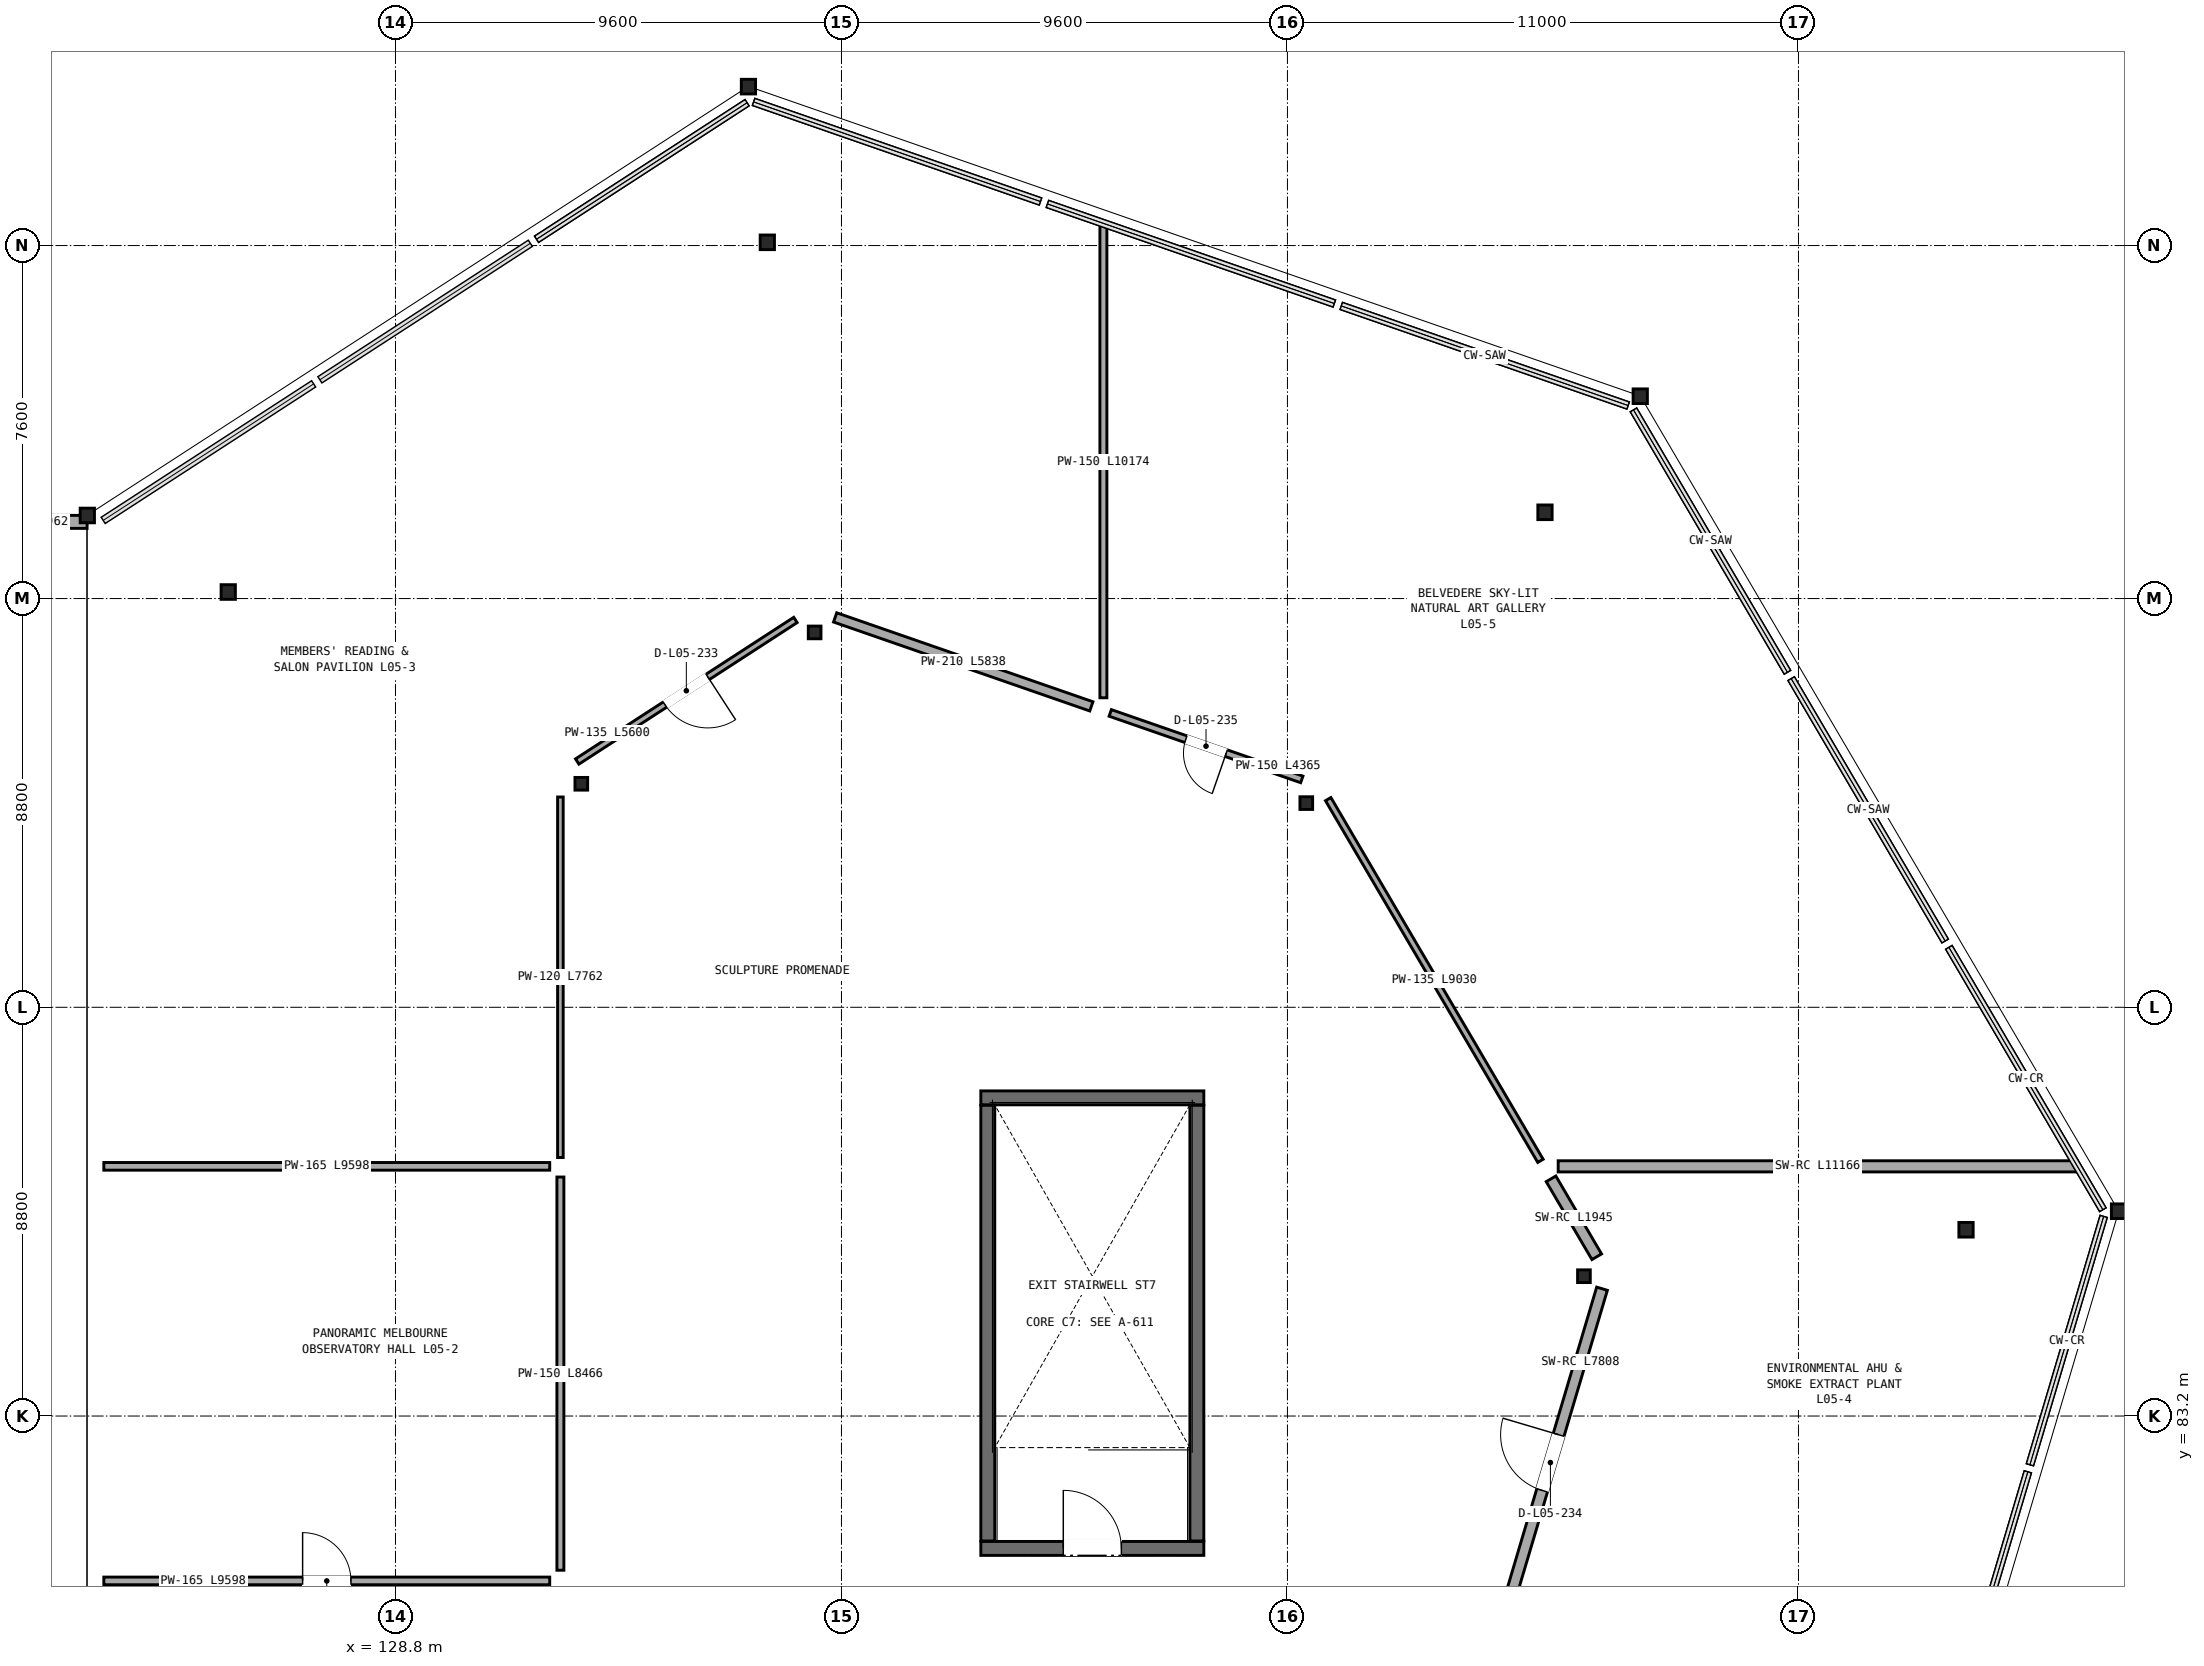
"""IFC4 building model, lengths in metres.
Left out: names, types, materials, properties, quantities, classifications, styles, units other than length and angle.
Written with IfcOpenShell. Run it as: python <this file> out.ifc"""

import sys

from ifc_helpers import new_model, si_unit, direction, frame, frame_2d, origin, origin_2d, place, context, subcontext, project, spatial, rectangle, hollow_circle, i_section, extrude, element, fill, save


model = new_model("IFC4")
c1 = context("Model", 3, precision=1e-05, world=origin(), true_north=direction((0.0, 1.0)))
c2 = subcontext(c1, "Body", "Model", "MODEL_VIEW")
j1 = project(units=[si_unit("LENGTHUNIT", "METRE"), si_unit("PLANEANGLEUNIT", "RADIAN")], contexts=[c1])
p1 = place(None, origin())
s1 = spatial("IfcSite", under=j1, at=p1, CompositionType="ELEMENT")
p2 = place(p1, origin())
s2 = spatial("IfcBuilding", under=s1, at=p2, CompositionType="ELEMENT")
p3 = place(p2, frame((0.0, 0.0, 28.1)))
s3 = spatial("IfcBuildingStorey", under=s2, at=p3, CompositionType="ELEMENT", Elevation=28.1)
p4 = place(p3, frame((165.889, 87.61, 0.035), z_axis=(-0.04804001111, -0.005843865394, 0.998828316864), x_axis=(0.120755624361, -0.99268226497, 0.0)))
e1 = element("IfcColumn", 1, at=p4, inside=s3, PredefinedType="COLUMN", context=c2, shape_type="SweptSolid", body=[
    extrude(i_section(OverallWidth=0.307, OverallDepth=0.315, WebThickness=0.012, FlangeThickness=0.019, FilletRadius=0.017, at=origin_2d()), origin(), (0.0, 0.0, 1.0), 5.682),
])
p5 = place(p3, frame((162.607, 87.21, 0.0), z_axis=(0.0, 0.0, 1.0), x_axis=(1.0, 0.0, 0.0)))
e2 = element("IfcColumn", 2, at=p5, inside=s3, PredefinedType="COLUMN", context=c2, shape_type="SweptSolid", body=[
    extrude(i_section(OverallWidth=0.307, OverallDepth=0.315, WebThickness=0.012, FlangeThickness=0.019, FilletRadius=0.017, at=origin_2d()), origin(), (0.0, 0.0, 1.0), 4.3),
])
p6 = place(p3, frame((154.382, 86.21, 0.0), z_axis=(0.0, 0.0, 1.0), x_axis=(1.0, 0.0, 0.0)))
e3 = element("IfcColumn", 3, at=p6, inside=s3, PredefinedType="COLUMN", context=c2, shape_type="SweptSolid", body=[
    extrude(hollow_circle(Radius=0.136, WallThickness=0.009, at=origin_2d()), origin(), (0.0, 0.0, 1.0), 4.3),
])
p7 = place(p3, frame((155.594, 105.156, 0.035), z_axis=(-0.027795330703, -0.033888003479, 0.999039049693), x_axis=(0.773187597765, -0.63417737161, 0.0)))
e4 = element("IfcColumn", 4, at=p7, inside=s3, PredefinedType="COLUMN", context=c2, shape_type="SweptSolid", body=[
    extrude(i_section(OverallWidth=0.307, OverallDepth=0.315, WebThickness=0.012, FlangeThickness=0.019, FilletRadius=0.017, at=origin_2d()), origin(), (0.0, 0.0, 1.0), 6.131),
])
p8 = place(p3, frame((153.544, 102.657, 0.0), z_axis=(0.0, 0.0, 1.0), x_axis=(1.0, 0.0, 0.0)))
e5 = element("IfcColumn", 5, at=p8, inside=s3, PredefinedType="COLUMN", context=c2, shape_type="SweptSolid", body=[
    extrude(i_section(OverallWidth=0.307, OverallDepth=0.315, WebThickness=0.012, FlangeThickness=0.019, FilletRadius=0.017, at=origin_2d()), origin(), (0.0, 0.0, 1.0), 4.3),
])
p9 = place(p3, frame((148.406, 96.396, 0.0), z_axis=(0.0, 0.0, 1.0), x_axis=(1.0, 0.0, 0.0)))
e6 = element("IfcColumn", 6, at=p9, inside=s3, PredefinedType="COLUMN", context=c2, shape_type="SweptSolid", body=[
    extrude(hollow_circle(Radius=0.136, WallThickness=0.009, at=origin_2d()), origin(), (0.0, 0.0, 1.0), 4.3),
])
p10 = place(p3, frame((136.398, 111.821, 0.035), z_axis=(0.006378097242, -0.052734847487, 0.998588181252), x_axis=(0.992765244262, 0.120071519464, 0.0)))
e7 = element("IfcColumn", 7, at=p10, inside=s3, PredefinedType="COLUMN", context=c2, shape_type="SweptSolid", body=[
    extrude(i_section(OverallWidth=0.307, OverallDepth=0.315, WebThickness=0.012, FlangeThickness=0.019, FilletRadius=0.017, at=origin_2d()), origin(), (0.0, 0.0, 1.0), 5.282),
])
p11 = place(p3, frame((136.804, 108.469, 0.0), z_axis=(0.0, 0.0, 1.0), x_axis=(1.0, 0.0, 0.0)))
e8 = element("IfcColumn", 8, at=p11, inside=s3, PredefinedType="COLUMN", context=c2, shape_type="SweptSolid", body=[
    extrude(i_section(OverallWidth=0.307, OverallDepth=0.315, WebThickness=0.012, FlangeThickness=0.019, FilletRadius=0.017, at=origin_2d()), origin(), (0.0, 0.0, 1.0), 4.3),
])
p12 = place(p3, frame((137.823, 100.071, 0.0), z_axis=(0.0, 0.0, 1.0), x_axis=(1.0, 0.0, 0.0)))
e9 = element("IfcColumn", 9, at=p12, inside=s3, PredefinedType="COLUMN", context=c2, shape_type="SweptSolid", body=[
    extrude(hollow_circle(Radius=0.136, WallThickness=0.009, at=origin_2d()), origin(), (0.0, 0.0, 1.0), 4.3),
])
p13 = place(p3, frame((122.167, 102.588, 0.035), z_axis=(0.062500546589, -0.033942697615, 0.997467580904), x_axis=(0.477242042364, 0.878771889059, 0.0)))
e10 = element("IfcColumn", 10, at=p13, inside=s3, PredefinedType="COLUMN", context=c2, shape_type="SweptSolid", body=[
    extrude(i_section(OverallWidth=0.307, OverallDepth=0.315, WebThickness=0.012, FlangeThickness=0.019, FilletRadius=0.017, at=origin_2d()), origin(), (0.0, 0.0, 1.0), 4.035),
])
p14 = place(p3, frame((125.2, 100.941, 0.0), z_axis=(0.0, 0.0, 1.0), x_axis=(1.0, 0.0, 0.0)))
e11 = element("IfcColumn", 11, at=p14, inside=s3, PredefinedType="COLUMN", context=c2, shape_type="SweptSolid", body=[
    extrude(i_section(OverallWidth=0.307, OverallDepth=0.315, WebThickness=0.012, FlangeThickness=0.019, FilletRadius=0.017, at=origin_2d()), origin(), (0.0, 0.0, 1.0), 4.3),
])
p15 = place(p3, frame((132.8, 96.812, 0.0), z_axis=(0.0, 0.0, 1.0), x_axis=(1.0, 0.0, 0.0)))
e12 = element("IfcColumn", 12, at=p15, inside=s3, PredefinedType="COLUMN", context=c2, shape_type="SweptSolid", body=[
    extrude(hollow_circle(Radius=0.136, WallThickness=0.009, at=origin_2d()), origin(), (0.0, 0.0, 1.0), 4.3),
])
p16 = place(p3, frame((122.162, 102.451, 0.0), z_axis=(0.0, 0.0, 1.0), x_axis=(-1.0, 0.0, 0.0)))
e13 = element("IfcWall", 13, at=p16, inside=s3, PredefinedType="STANDARD", context=c2, shape_type="SweptSolid", body=[
    extrude(rectangle(XDim=2.962, YDim=0.28, at=frame_2d((1.481, 0.0))), origin(), (0.0, 0.0, 1.0), 3.255),
])
p17 = place(p3, frame((141.4, 80.35, 0.0), z_axis=(0.0, 0.0, 1.0), x_axis=(1.0, 0.0, 0.0)))
e14 = element("IfcWall", 14, at=p17, inside=s3, PredefinedType="SHEAR", context=c2, shape_type="SweptSolid", body=[
    extrude(rectangle(XDim=4.8, YDim=0.3, at=frame_2d((2.4, 0.0))), origin(), (0.0, 0.0, 1.0), 4.245),
])
p18 = place(p17, frame((1.775, 0.0, 0.0)))
e15 = element("IfcOpeningElement", 15, at=p18, cuts=e14, PredefinedType="OPENING", context=c2, shape_type="SweptSolid", body=[
    extrude(rectangle(XDim=1.25, YDim=2.2, at=frame_2d((0.625, 1.1))), frame((0.0, 0.16, 0.0), z_axis=(0.0, -1.0, 0.0), x_axis=(1.0, 0.0, 0.0)), (0.0, 0.0, 1.0), 0.32),
])
p19 = place(p3, frame((146.2, 90.05, 0.0), z_axis=(0.0, 0.0, 1.0), x_axis=(-1.0, 0.0, 0.0)))
e16 = element("IfcWall", 16, at=p19, inside=s3, PredefinedType="SHEAR", context=c2, shape_type="SweptSolid", body=[
    extrude(rectangle(XDim=4.8, YDim=0.3, at=frame_2d((2.4, 0.0))), origin(), (0.0, 0.0, 1.0), 4.245),
])
for number, where, z_axis, x_axis in (
    (17, (146.05, 80.51, 0.0), (0.0, 0.0, 1.0), (0.0, 1.0, 0.0)),
    (18, (141.55, 89.89, 0.0), (0.0, 0.0, 1.0), (0.0, -1.0, 0.0)),
):
    element("IfcWall", number, at=place(p3, frame(where, z_axis=z_axis, x_axis=x_axis)), inside=s3, PredefinedType="SHEAR", context=c2, shape_type="SweptSolid", body=[
        extrude(rectangle(XDim=9.38, YDim=0.3, at=frame_2d((4.69, 0.0))), origin(), (0.0, 0.0, 1.0), 4.245),
    ])
p20 = place(p3, frame((132.12, 79.65, 0.0), z_axis=(0.0, 0.0, 1.0), x_axis=(-1.0, 0.0, 0.0)))
e19 = element("IfcWall", 19, at=p20, inside=s3, PredefinedType="PARTITIONING", context=c2, shape_type="SweptSolid", body=[
    extrude(rectangle(XDim=9.598, YDim=0.165, at=frame_2d((4.799, 0.0))), origin(), (0.0, 0.0, 1.0), 2.45),
])
p21 = place(p20, frame((4.279, 0.0, 0.0)))
e20 = element("IfcOpeningElement", 20, at=p21, cuts=e19, PredefinedType="OPENING", context=c2, shape_type="SweptSolid", body=[
    extrude(rectangle(XDim=1.04, YDim=2.08, at=frame_2d((0.52, 1.04))), frame((0.0, 0.093, 0.0), z_axis=(0.0, -1.0, 0.0), x_axis=(1.0, 0.0, 0.0)), (0.0, 0.0, 1.0), 0.185),
])
p22 = place(p3, frame((132.35, 88.346, 0.0), z_axis=(0.0, 0.0, 1.0), x_axis=(0.0, -1.0, 0.0)))
e21 = element("IfcWall", 21, at=p22, inside=s3, PredefinedType="PARTITIONING", context=c2, shape_type="SweptSolid", body=[
    extrude(rectangle(XDim=8.466, YDim=0.15, at=frame_2d((4.233, 0.0))), origin(), (0.0, 0.0, 1.0), 4.13),
])
p23 = place(p3, frame((137.409, 100.339, 0.0), z_axis=(0.0, 0.0, 1.0), x_axis=(-0.838914477988, -0.544263262238, 0.0)))
e22 = element("IfcWall", 22, at=p23, inside=s3, PredefinedType="PARTITIONING", context=c2, shape_type="SweptSolid", body=[
    extrude(rectangle(XDim=5.6, YDim=0.135, at=frame_2d((2.8, 0.0))), origin(), (0.0, 0.0, 1.0), 2.45),
])
p24 = place(p23, frame((2.25, 0.0, 0.0)))
e23 = element("IfcOpeningElement", 23, at=p24, cuts=e22, PredefinedType="OPENING", context=c2, shape_type="SweptSolid", body=[
    extrude(rectangle(XDim=1.1, YDim=2.08, at=frame_2d((0.55, 1.04))), frame((0.0, 0.078, 0.0), z_axis=(0.0, -1.0, 0.0), x_axis=(1.0, 0.0, 0.0)), (0.0, 0.0, 1.0), 0.155),
])
p25 = place(p3, frame((132.35, 96.527, 0.0), z_axis=(0.0, 0.0, 1.0), x_axis=(0.0, -1.0, 0.0)))
e24 = element("IfcWall", 24, at=p25, inside=s3, PredefinedType="PARTITIONING", context=c2, shape_type="SweptSolid", body=[
    extrude(rectangle(XDim=7.762, YDim=0.12, at=frame_2d((3.881, 0.0))), origin(), (0.0, 0.0, 1.0), 4.13),
])
p26 = place(p3, frame((143.779, 98.479, 0.0), z_axis=(0.0, 0.0, 1.0), x_axis=(-0.94466592491, 0.328033977378, 0.0)))
e25 = element("IfcWall", 25, at=p26, inside=s3, PredefinedType="PARTITIONING", context=c2, shape_type="SweptSolid", body=[
    extrude(rectangle(XDim=5.838, YDim=0.21, at=frame_2d((2.919, 0.0))), origin(), (0.0, 0.0, 1.0), 4.13),
])
p27 = place(p3, frame((152.549, 78.456, 0.0), z_axis=(0.0, 0.0, 1.0), x_axis=(0.284584370511, 0.958650998049, 0.0)))
e26 = element("IfcWall", 26, at=p27, inside=s3, PredefinedType="SOLIDWALL", context=c2, shape_type="SweptSolid", body=[
    extrude(rectangle(XDim=7.808, YDim=0.24, at=frame_2d((3.904, 0.0))), origin(), (0.0, 0.0, 1.0), 2.45),
])
p28 = place(p27, frame((3.279, 0.0, 0.0)))
e27 = element("IfcOpeningElement", 27, at=p28, cuts=e26, PredefinedType="OPENING", context=c2, shape_type="SweptSolid", body=[
    extrude(rectangle(XDim=1.25, YDim=2.2, at=frame_2d((0.625, 1.1))), frame((0.0, 0.13, 0.0), z_axis=(0.0, -1.0, 0.0), x_axis=(1.0, 0.0, 0.0)), (0.0, 0.0, 1.0), 0.26),
])
p29 = place(p3, frame((154.658, 86.629, 0.0), z_axis=(0.0, 0.0, 1.0), x_axis=(-0.505961073315, 0.862556312533, 0.0)))
e28 = element("IfcWall", 28, at=p29, inside=s3, PredefinedType="SOLIDWALL", context=c2, shape_type="SweptSolid", body=[
    extrude(rectangle(XDim=1.945, YDim=0.24, at=frame_2d((0.973, 0.0))), origin(), (0.0, 0.0, 1.0), 4.13),
])
p30 = place(p3, frame((148.309, 96.906, 0.0), z_axis=(0.0, 0.0, 1.0), x_axis=(-0.944666442817, 0.328032485916, 0.0)))
e29 = element("IfcWall", 29, at=p30, inside=s3, PredefinedType="PARTITIONING", context=c2, shape_type="SweptSolid", body=[
    extrude(rectangle(XDim=4.365, YDim=0.15, at=frame_2d((2.183, 0.0))), origin(), (0.0, 0.0, 1.0), 2.45),
])
p31 = place(p30, frame((1.723, 0.0, 0.0)))
e30 = element("IfcOpeningElement", 30, at=p31, cuts=e29, PredefinedType="OPENING", context=c2, shape_type="SweptSolid", body=[
    extrude(rectangle(XDim=0.92, YDim=2.16, at=frame_2d((0.46, 1.08))), frame((0.0, 0.085, 0.0), z_axis=(0.0, -1.0, 0.0), x_axis=(1.0, 0.0, 0.0)), (0.0, 0.0, 1.0), 0.17),
])
p32 = place(p3, frame((153.447, 88.694, 0.0), z_axis=(0.0, 0.0, 1.0), x_axis=(-0.506061544591, 0.862497369901, 0.0)))
e31 = element("IfcWall", 31, at=p32, inside=s3, PredefinedType="PARTITIONING", context=c2, shape_type="SweptSolid", body=[
    extrude(rectangle(XDim=9.03, YDim=0.135, at=frame_2d((4.515, 0.0))), origin(), (0.0, 0.0, 1.0), 2.45),
])
p33 = place(p3, frame((122.522, 88.576, 0.0), z_axis=(0.0, 0.0, 1.0), x_axis=(1.0, 0.0, 0.0)))
e32 = element("IfcWall", 32, at=p33, inside=s3, PredefinedType="PARTITIONING", context=c2, shape_type="SweptSolid", body=[
    extrude(rectangle(XDim=9.598, YDim=0.165, at=frame_2d((4.799, 0.0))), origin(), (0.0, 0.0, 1.0), 2.45),
])
p34 = place(p3, frame((144.038, 108.837, 0.0), z_axis=(0.0, 0.0, 1.0), x_axis=(0.0, -1.0, 0.0)))
e33 = element("IfcWall", 33, at=p34, inside=s3, PredefinedType="PARTITIONING", context=c2, shape_type="SweptSolid", body=[
    extrude(rectangle(XDim=10.174, YDim=0.15, at=frame_2d((5.087, 0.0))), origin(), (0.0, 0.0, 1.0), 2.45),
])
p35 = place(p3, frame((153.828, 88.576, 0.0), z_axis=(0.0, 0.0, 1.0), x_axis=(1.0, 0.0, 0.0)))
e34 = element("IfcWall", 34, at=p35, inside=s3, PredefinedType="SOLIDWALL", context=c2, shape_type="SweptSolid", body=[
    extrude(rectangle(XDim=11.166, YDim=0.24, at=frame_2d((5.583, 0.0))), origin(), (0.0, 0.0, 1.0), 2.45),
])
p36 = place(p18, origin())
e35 = element("IfcDoor", 35, at=p36, inside=s3, OperationType="SINGLE_SWING_LEFT", PredefinedType="DOOR", context=c2, shape_type="SweptSolid", body=[
    extrude(rectangle(XDim=1.25, YDim=2.2, at=frame_2d((0.625, 1.1))), frame((0.0, 0.025, 0.0), z_axis=(0.0, -1.0, 0.0), x_axis=(1.0, 0.0, 0.0)), (0.0, 0.0, 1.0), 0.05),
])
fill(e15, e35)
p37 = place(p21, frame((1.04, 0.0, 0.0), z_axis=(0.0, 0.0, 1.0), x_axis=(-1.0, 0.0, 0.0)))
e36 = element("IfcDoor", 36, at=p37, inside=s3, OperationType="SINGLE_SWING_RIGHT", PredefinedType="DOOR", context=c2, shape_type="SweptSolid", body=[
    extrude(rectangle(XDim=1.04, YDim=2.08, at=frame_2d((0.52, 1.04))), frame((0.0, 0.025, 0.0), z_axis=(0.0, -1.0, 0.0), x_axis=(1.0, 0.0, 0.0)), (0.0, 0.0, 1.0), 0.05),
])
fill(e20, e36)
p38 = place(p24, origin())
e37 = element("IfcDoor", 37, at=p38, inside=s3, OperationType="SINGLE_SWING_LEFT", PredefinedType="DOOR", context=c2, shape_type="SweptSolid", body=[
    extrude(rectangle(XDim=1.1, YDim=2.08, at=frame_2d((0.55, 1.04))), frame((0.0, 0.025, 0.0), z_axis=(0.0, -1.0, 0.0), x_axis=(1.0, 0.0, 0.0)), (0.0, 0.0, 1.0), 0.05),
])
fill(e23, e37)
p39 = place(p28, origin())
e38 = element("IfcDoor", 38, at=p39, inside=s3, OperationType="SINGLE_SWING_RIGHT", PredefinedType="DOOR", context=c2, shape_type="SweptSolid", body=[
    extrude(rectangle(XDim=1.25, YDim=2.2, at=frame_2d((0.625, 1.1))), frame((0.0, 0.025, 0.0), z_axis=(0.0, -1.0, 0.0), x_axis=(1.0, 0.0, 0.0)), (0.0, 0.0, 1.0), 0.05),
])
fill(e27, e38)
p40 = place(p31, origin())
e39 = element("IfcDoor", 39, at=p40, inside=s3, OperationType="SINGLE_SWING_LEFT", PredefinedType="DOOR", context=c2, shape_type="SweptSolid", body=[
    extrude(rectangle(XDim=0.92, YDim=2.16, at=frame_2d((0.46, 1.08))), frame((0.0, 0.025, 0.0), z_axis=(0.0, -1.0, 0.0), x_axis=(1.0, 0.0, 0.0)), (0.0, 0.0, 1.0), 0.05),
])
fill(e30, e39)
save(model, sys.argv[1])
